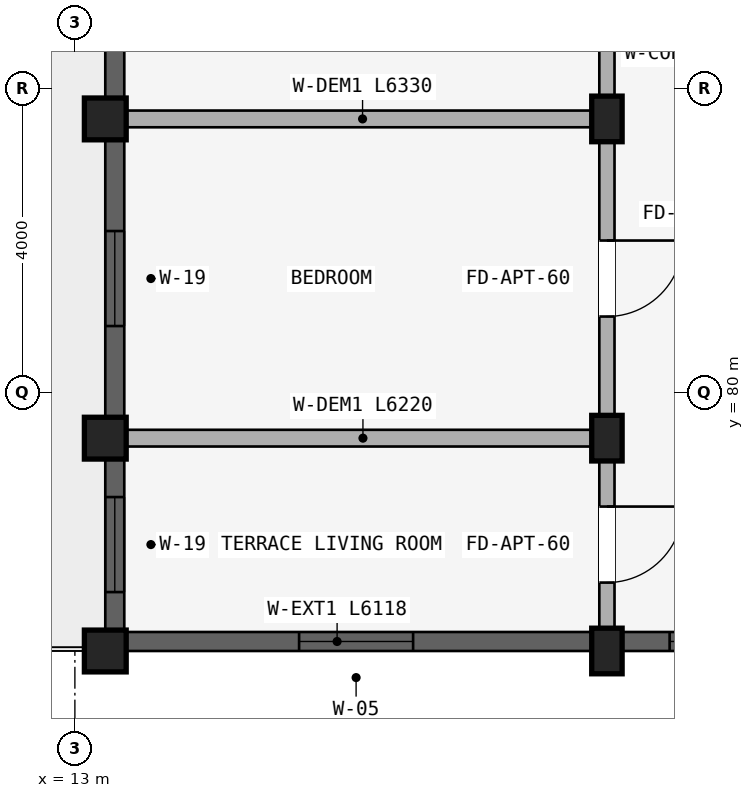
"""IFC4 building model, lengths in metres.
Left out: names, types, materials, properties, quantities, classifications, styles, units other than length and angle.
Written with IfcOpenShell. Run it as: python <this file> out.ifc"""

import sys

from ifc_helpers import new_model, si_unit, direction, frame, frame_2d, origin, origin_2d, place, context, subcontext, project, spatial, rectangle, extrude, element, fill, save


model = new_model("IFC4")
c1 = context("Model", 3, precision=1e-05, world=origin(), true_north=direction((0.0, 1.0)))
c2 = subcontext(c1, "Body", "Model", "MODEL_VIEW")
j1 = project(units=[si_unit("LENGTHUNIT", "METRE"), si_unit("PLANEANGLEUNIT", "RADIAN")], contexts=[c1])
p1 = place(None, origin())
s1 = spatial("IfcSite", under=j1, at=p1, CompositionType="ELEMENT")
p2 = place(p1, origin())
s2 = spatial("IfcBuilding", under=s1, at=p2, CompositionType="ELEMENT")
p3 = place(p2, frame((0.0, 0.0, 49.65)))
s3 = spatial("IfcBuildingStorey", under=s2, at=p3, CompositionType="ELEMENT", Elevation=49.65)
p4 = place(p3, frame((20.0, 83.6, 0.0), z_axis=(0.0, 0.0, 1.0), x_axis=(1.0, 0.0, 0.0)))
e1 = element("IfcColumn", 1, at=p4, inside=s3, PredefinedType="COLUMN", context=c2, shape_type="SweptSolid", body=[
    extrude(rectangle(XDim=0.4, YDim=0.6, at=origin_2d()), origin(), (0.0, 0.0, 1.0), 2.91),
])
p5 = place(p3, frame((13.4, 83.6, 0.0), z_axis=(0.0, 0.0, 1.0), x_axis=(1.0, 0.0, 0.0)))
e2 = element("IfcColumn", 2, at=p5, inside=s3, PredefinedType="COLUMN", context=c2, shape_type="SweptSolid", body=[
    extrude(rectangle(XDim=0.55, YDim=0.55, at=origin_2d()), origin(), (0.0, 0.0, 1.0), 2.91),
])
p6 = place(p3, frame((20.0, 79.4, 0.0), z_axis=(0.0, 0.0, 1.0), x_axis=(1.0, 0.0, 0.0)))
e3 = element("IfcColumn", 3, at=p6, inside=s3, PredefinedType="COLUMN", context=c2, shape_type="SweptSolid", body=[
    extrude(rectangle(XDim=0.4, YDim=0.6, at=origin_2d()), origin(), (0.0, 0.0, 1.0), 2.91),
])
p7 = place(p3, frame((13.4, 79.4, 0.0), z_axis=(0.0, 0.0, 1.0), x_axis=(1.0, 0.0, 0.0)))
e4 = element("IfcColumn", 4, at=p7, inside=s3, PredefinedType="COLUMN", context=c2, shape_type="SweptSolid", body=[
    extrude(rectangle(XDim=0.55, YDim=0.55, at=origin_2d()), origin(), (0.0, 0.0, 1.0), 2.91),
])
p8 = place(p3, frame((20.0, 76.6, 0.0), z_axis=(0.0, 0.0, 1.0), x_axis=(1.0, 0.0, 0.0)))
e5 = element("IfcColumn", 5, at=p8, inside=s3, PredefinedType="COLUMN", context=c2, shape_type="SweptSolid", body=[
    extrude(rectangle(XDim=0.4, YDim=0.6, at=origin_2d()), origin(), (0.0, 0.0, 1.0), 2.91),
])
p9 = place(p3, frame((13.4, 76.6, 0.0), z_axis=(0.0, 0.0, 1.0), x_axis=(1.0, 0.0, 0.0)))
e6 = element("IfcColumn", 6, at=p9, inside=s3, PredefinedType="COLUMN", context=c2, shape_type="SweptSolid", body=[
    extrude(rectangle(XDim=0.55, YDim=0.55, at=origin_2d()), origin(), (0.0, 0.0, 1.0), 2.91),
])
p10 = place(p3, frame((20.0, 87.65, 0.0), z_axis=(0.0, 0.0, 1.0), x_axis=(0.0, -1.0, 0.0)))
e7 = element("IfcWall", 7, at=p10, inside=s3, PredefinedType="STANDARD", context=c2, shape_type="SweptSolid", body=[
    extrude(rectangle(XDim=4.05, YDim=0.2, at=frame_2d((2.025, 0.0))), origin(), (0.0, 0.0, 1.0), 2.352),
])
p11 = place(p10, frame((1.525, 0.0, 0.0)))
e8 = element("IfcOpeningElement", 8, at=p11, cuts=e7, PredefinedType="OPENING", context=c2, shape_type="SweptSolid", body=[
    extrude(rectangle(XDim=1.0, YDim=2.15, at=frame_2d((0.5, 1.075))), frame((0.0, 0.11, 0.0), z_axis=(0.0, -1.0, 0.0), x_axis=(1.0, 0.0, 0.0)), (0.0, 0.0, 1.0), 0.22),
])
p12 = place(p3, frame((20.0, 83.6, 0.0), z_axis=(0.0, 0.0, 1.0), x_axis=(0.0, -1.0, 0.0)))
e9 = element("IfcWall", 9, at=p12, inside=s3, PredefinedType="STANDARD", context=c2, shape_type="SweptSolid", body=[
    extrude(rectangle(XDim=4.2, YDim=0.2, at=frame_2d((2.1, 0.0))), origin(), (0.0, 0.0, 1.0), 2.352),
])
p13 = place(p12, frame((1.6, 0.0, 0.0)))
e10 = element("IfcOpeningElement", 10, at=p13, cuts=e9, PredefinedType="OPENING", context=c2, shape_type="SweptSolid", body=[
    extrude(rectangle(XDim=1.0, YDim=2.15, at=frame_2d((0.5, 1.075))), frame((0.0, 0.11, 0.0), z_axis=(0.0, -1.0, 0.0), x_axis=(1.0, 0.0, 0.0)), (0.0, 0.0, 1.0), 0.22),
])
p14 = place(p3, frame((19.95, 83.6, 0.0), z_axis=(0.0, 0.0, 1.0), x_axis=(-1.0, 0.0, 0.0)))
e11 = element("IfcWall", 11, at=p14, inside=s3, PredefinedType="STANDARD", context=c2, shape_type="SweptSolid", body=[
    extrude(rectangle(XDim=6.33, YDim=0.22, at=frame_2d((3.165, 0.0))), origin(), (0.0, 0.0, 1.0), 2.352),
])
p15 = place(p3, frame((20.0, 79.4, 0.0), z_axis=(0.0, 0.0, 1.0), x_axis=(0.0, -1.0, 0.0)))
e12 = element("IfcWall", 12, at=p15, inside=s3, PredefinedType="STANDARD", context=c2, shape_type="SweptSolid", body=[
    extrude(rectangle(XDim=2.8, YDim=0.2, at=frame_2d((1.4, 0.0))), origin(), (0.0, 0.0, 1.0), 2.352),
])
p16 = place(p15, frame((0.9, 0.0, 0.0)))
e13 = element("IfcOpeningElement", 13, at=p16, cuts=e12, PredefinedType="OPENING", context=c2, shape_type="SweptSolid", body=[
    extrude(rectangle(XDim=1.0, YDim=2.15, at=frame_2d((0.5, 1.075))), frame((0.0, 0.11, 0.0), z_axis=(0.0, -1.0, 0.0), x_axis=(1.0, 0.0, 0.0)), (0.0, 0.0, 1.0), 0.22),
])
p17 = place(p3, frame((19.9, 79.4, 0.0), z_axis=(0.0, 0.0, 1.0), x_axis=(-1.0, 0.0, 0.0)))
e14 = element("IfcWall", 14, at=p17, inside=s3, PredefinedType="STANDARD", context=c2, shape_type="SweptSolid", body=[
    extrude(rectangle(XDim=6.22, YDim=0.22, at=frame_2d((3.11, 0.0))), origin(), (0.0, 0.0, 1.0), 2.352),
])
p18 = place(p3, frame((13.525, 87.521, 0.0), z_axis=(0.0, 0.0, 1.0), x_axis=(0.0, -1.0, 0.0)))
e15 = element("IfcWall", 15, at=p18, inside=s3, PredefinedType="STANDARD", context=c2, shape_type="SweptSolid", body=[
    extrude(rectangle(XDim=3.643, YDim=0.25, at=frame_2d((1.822, 0.0))), origin(), (0.0, 0.0, 1.0), 2.452),
])
p19 = place(p18, frame((1.197, 0.0, 0.702)))
e16 = element("IfcOpeningElement", 16, at=p19, cuts=e15, PredefinedType="OPENING", context=c2, shape_type="SweptSolid", body=[
    extrude(rectangle(XDim=1.25, YDim=1.55, at=frame_2d((0.625, 0.775))), frame((0.0, 0.135, 0.0), z_axis=(0.0, -1.0, 0.0), x_axis=(1.0, 0.0, 0.0)), (0.0, 0.0, 1.0), 0.27),
])
p20 = place(p3, frame((13.525, 83.322, 0.0), z_axis=(0.0, 0.0, 1.0), x_axis=(0.0, -1.0, 0.0)))
e17 = element("IfcWall", 17, at=p20, inside=s3, PredefinedType="STANDARD", context=c2, shape_type="SweptSolid", body=[
    extrude(rectangle(XDim=3.643, YDim=0.25, at=frame_2d((1.822, 0.0))), origin(), (0.0, 0.0, 1.0), 2.452),
])
p21 = place(p20, frame((1.197, 0.0, 0.702)))
e18 = element("IfcOpeningElement", 18, at=p21, cuts=e17, PredefinedType="OPENING", context=c2, shape_type="SweptSolid", body=[
    extrude(rectangle(XDim=1.25, YDim=1.55, at=frame_2d((0.625, 0.775))), frame((0.0, 0.135, 0.0), z_axis=(0.0, -1.0, 0.0), x_axis=(1.0, 0.0, 0.0)), (0.0, 0.0, 1.0), 0.27),
])
p22 = place(p3, frame((13.525, 79.122, 0.0), z_axis=(0.0, 0.0, 1.0), x_axis=(0.0, -1.0, 0.0)))
e19 = element("IfcWall", 19, at=p22, inside=s3, PredefinedType="STANDARD", context=c2, shape_type="SweptSolid", body=[
    extrude(rectangle(XDim=2.243, YDim=0.25, at=frame_2d((1.122, 0.0))), origin(), (0.0, 0.0, 1.0), 2.452),
])
p23 = place(p22, frame((0.497, 0.0, 0.702)))
e20 = element("IfcOpeningElement", 20, at=p23, cuts=e19, PredefinedType="OPENING", context=c2, shape_type="SweptSolid", body=[
    extrude(rectangle(XDim=1.25, YDim=1.55, at=frame_2d((0.625, 0.775))), frame((0.0, 0.135, 0.0), z_axis=(0.0, -1.0, 0.0), x_axis=(1.0, 0.0, 0.0)), (0.0, 0.0, 1.0), 0.27),
])
p24 = place(p3, frame((22.197, 76.725, 0.0), z_axis=(0.0, 0.0, 1.0), x_axis=(-1.0, 0.0, 0.0)))
e21 = element("IfcWall", 21, at=p24, inside=s3, PredefinedType="STANDARD", context=c2, shape_type="SweptSolid", body=[
    extrude(rectangle(XDim=1.993, YDim=0.25, at=frame_2d((0.997, 0.0))), origin(), (0.0, 0.0, 1.0), 2.352),
])
p25 = place(p24, frame((0.622, 0.0, 0.88)))
e22 = element("IfcOpeningElement", 22, at=p25, cuts=e21, PredefinedType="OPENING", context=c2, shape_type="SweptSolid", body=[
    extrude(rectangle(XDim=0.75, YDim=1.05, at=frame_2d((0.375, 0.525))), frame((0.0, 0.135, 0.0), z_axis=(0.0, -1.0, 0.0), x_axis=(1.0, 0.0, 0.0)), (0.0, 0.0, 1.0), 0.27),
])
p26 = place(p3, frame((19.796, 76.725, 0.0), z_axis=(0.0, 0.0, 1.0), x_axis=(-1.0, 0.0, 0.0)))
e23 = element("IfcWall", 23, at=p26, inside=s3, PredefinedType="STANDARD", context=c2, shape_type="SweptSolid", body=[
    extrude(rectangle(XDim=6.118, YDim=0.25, at=frame_2d((3.059, 0.0))), origin(), (0.0, 0.0, 1.0), 2.46),
])
p27 = place(p26, frame((2.346, 0.0, 0.61)))
e24 = element("IfcOpeningElement", 24, at=p27, cuts=e23, PredefinedType="OPENING", context=c2, shape_type="SweptSolid", body=[
    extrude(rectangle(XDim=1.5, YDim=1.65, at=frame_2d((0.75, 0.825))), frame((0.0, 0.135, 0.0), z_axis=(0.0, -1.0, 0.0), x_axis=(1.0, 0.0, 0.0)), (0.0, 0.0, 1.0), 0.27),
])
p28 = place(p21, origin())
e25 = element("IfcWindow", 25, at=p28, inside=s3, PartitioningType="SINGLE_PANEL", PredefinedType="WINDOW", context=c2, shape_type="SweptSolid", body=[
    extrude(rectangle(XDim=1.25, YDim=1.55, at=frame_2d((0.625, 0.775))), frame((0.0, 0.03, 0.0), z_axis=(0.0, -1.0, 0.0), x_axis=(1.0, 0.0, 0.0)), (0.0, 0.0, 1.0), 0.06),
])
fill(e18, e25)
p29 = place(p23, origin())
e26 = element("IfcWindow", 26, at=p29, inside=s3, PartitioningType="SINGLE_PANEL", PredefinedType="WINDOW", context=c2, shape_type="SweptSolid", body=[
    extrude(rectangle(XDim=1.25, YDim=1.55, at=frame_2d((0.625, 0.775))), frame((0.0, 0.03, 0.0), z_axis=(0.0, -1.0, 0.0), x_axis=(1.0, 0.0, 0.0)), (0.0, 0.0, 1.0), 0.06),
])
fill(e20, e26)
p30 = place(p25, origin())
e27 = element("IfcWindow", 27, at=p30, inside=s3, PartitioningType="SINGLE_PANEL", PredefinedType="WINDOW", context=c2, shape_type="SweptSolid", body=[
    extrude(rectangle(XDim=0.75, YDim=1.05, at=frame_2d((0.375, 0.525))), frame((0.0, 0.03, 0.0), z_axis=(0.0, -1.0, 0.0), x_axis=(1.0, 0.0, 0.0)), (0.0, 0.0, 1.0), 0.06),
])
fill(e22, e27)
p31 = place(p27, origin())
e28 = element("IfcWindow", 28, at=p31, inside=s3, PartitioningType="DOUBLE_PANEL_VERTICAL", PredefinedType="WINDOW", context=c2, shape_type="SweptSolid", body=[
    extrude(rectangle(XDim=1.5, YDim=1.65, at=frame_2d((0.75, 0.825))), frame((0.0, 0.03, 0.0), z_axis=(0.0, -1.0, 0.0), x_axis=(1.0, 0.0, 0.0)), (0.0, 0.0, 1.0), 0.06),
])
fill(e24, e28)
p32 = place(p13, origin())
e29 = element("IfcDoor", 29, at=p32, inside=s3, OperationType="SINGLE_SWING_LEFT", PredefinedType="DOOR", context=c2, shape_type="SweptSolid", body=[
    extrude(rectangle(XDim=1.0, YDim=2.15, at=frame_2d((0.5, 1.075))), frame((0.0, 0.025, 0.0), z_axis=(0.0, -1.0, 0.0), x_axis=(1.0, 0.0, 0.0)), (0.0, 0.0, 1.0), 0.05),
])
fill(e10, e29)
p33 = place(p16, origin())
e30 = element("IfcDoor", 30, at=p33, inside=s3, OperationType="SINGLE_SWING_LEFT", PredefinedType="DOOR", context=c2, shape_type="SweptSolid", body=[
    extrude(rectangle(XDim=1.0, YDim=2.15, at=frame_2d((0.5, 1.075))), frame((0.0, 0.025, 0.0), z_axis=(0.0, -1.0, 0.0), x_axis=(1.0, 0.0, 0.0)), (0.0, 0.0, 1.0), 0.05),
])
fill(e13, e30)
save(model, sys.argv[1])
